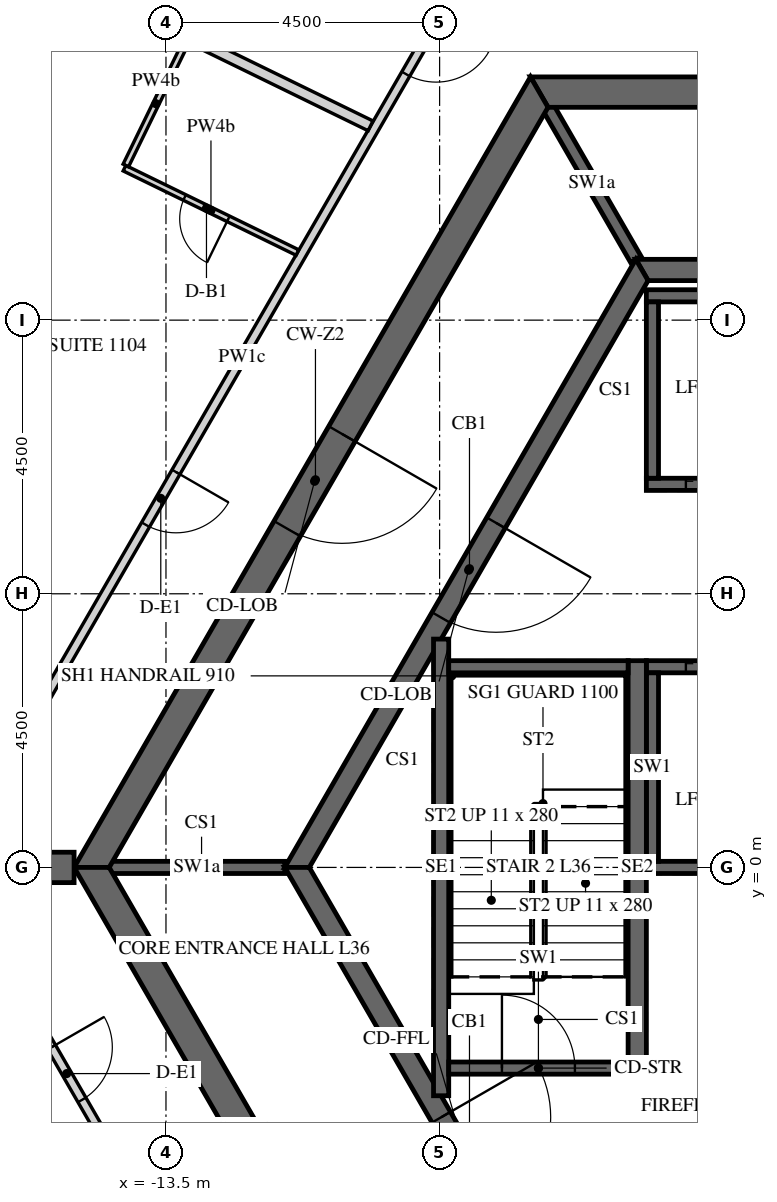
"""IFC4 building model, lengths in metres.
Left out: names, types, materials, properties, quantities, classifications, styles, units other than length and angle.
Written with IfcOpenShell. Run it as: python <this file> out.ifc"""

import sys

from ifc_helpers import new_model, si_unit, direction, frame, frame_2d, origin, place, context, subcontext, project, spatial, polyline, rectangle, outline, extrude, element, fill, save


model = new_model("IFC4")
c1 = context("Model", 3, precision=1e-05, world=origin(), true_north=direction((0.0, 1.0)))
c2 = subcontext(c1, "Body", "Model", "MODEL_VIEW")
j1 = project(units=[si_unit("LENGTHUNIT", "METRE"), si_unit("PLANEANGLEUNIT", "RADIAN")], contexts=[c1])
p1 = place(None, origin())
s1 = spatial("IfcSite", under=j1, at=p1, CompositionType="ELEMENT")
p2 = place(p1, origin())
s2 = spatial("IfcBuilding", under=s1, at=p2, CompositionType="ELEMENT")
p3 = place(p2, frame((0.0, 0.0, 156.6)))
s3 = spatial("IfcBuildingStorey", under=s2, at=p3, CompositionType="ELEMENT", Elevation=156.6)
p4 = place(p3, frame((-7.361, 12.75, -0.15), z_axis=(0.0, 0.0, 1.0), x_axis=(-0.50000571537, -0.866022103989, 0.0)))
e1 = element("IfcWall", 1, at=p4, inside=s3, PredefinedType="SHEAR", context=c2, shape_type="SweptSolid", body=[
    extrude(outline(polyline([(-0.144, -0.25), (14.867, -0.25), (14.578, 0.25), (0.144, 0.25), (-0.144, -0.25)])), origin(), (0.0, 0.0, 1.0), 3.9),
])
p5 = place(p4, frame((6.49, 0.0, 0.15)))
e2 = element("IfcOpeningElement", 2, at=p5, cuts=e1, PredefinedType="OPENING", context=c2, shape_type="SweptSolid", body=[
    extrude(rectangle(XDim=1.8, YDim=2.4, at=frame_2d((0.9, 1.2))), frame((0.0, 0.26, 0.0), z_axis=(0.0, -1.0, 0.0), x_axis=(1.0, 0.0, 0.0)), (0.0, 0.0, 1.0), 0.52),
])
p6 = place(p3, frame((-14.722, 0.0, -0.15), z_axis=(0.0, 0.0, 1.0), x_axis=(0.50000571537, -0.866022103989, 0.0)))
e3 = element("IfcWall", 3, at=p6, inside=s3, PredefinedType="SHEAR", context=c2, shape_type="SweptSolid", body=[
    extrude(outline(polyline([(-0.144, -0.25), (14.867, -0.25), (14.578, 0.25), (0.144, 0.25), (-0.144, -0.25)])), origin(), (0.0, 0.0, 1.0), 3.9),
])
p7 = place(p6, frame((6.432, 0.0, 0.15)))
e4 = element("IfcOpeningElement", 4, at=p7, cuts=e3, PredefinedType="OPENING", context=c2, shape_type="SweptSolid", body=[
    extrude(rectangle(XDim=1.8, YDim=2.4, at=frame_2d((0.9, 1.2))), frame((0.0, 0.26, 0.0), z_axis=(0.0, -1.0, 0.0), x_axis=(1.0, 0.0, 0.0)), (0.0, 0.0, 1.0), 0.52),
])
p8 = place(p3, frame((7.361, 12.75, -0.15), z_axis=(0.0, 0.0, 1.0), x_axis=(-1.0, 0.0, 0.0)))
e5 = element("IfcWall", 5, at=p8, inside=s3, PredefinedType="SHEAR", context=c2, shape_type="SweptSolid", body=[
    extrude(outline(polyline([(-0.144, -0.25), (14.866, -0.25), (14.578, 0.25), (0.144, 0.25), (-0.144, -0.25)])), origin(), (0.0, 0.0, 1.0), 3.9),
])
p9 = place(p8, frame((6.761, 0.0, 0.15)))
e6 = element("IfcOpeningElement", 6, at=p9, cuts=e5, PredefinedType="OPENING", context=c2, shape_type="SweptSolid", body=[
    extrude(rectangle(XDim=1.2, YDim=2.4, at=frame_2d((0.6, 1.2))), frame((0.0, 0.26, 0.0), z_axis=(0.0, -1.0, 0.0), x_axis=(1.0, 0.0, 0.0)), (0.0, 0.0, 1.0), 0.52),
])
p10 = place(p3, frame((-15.011, 0.0, -0.15), z_axis=(0.0, 0.0, 1.0), x_axis=(-1.0, 0.0, 0.0)))
e7 = element("IfcWall", 7, at=p10, inside=s3, PredefinedType="SHEAR", context=c2, shape_type="SweptSolid", body=[
    extrude(rectangle(XDim=15.424, YDim=0.5, at=frame_2d((7.712, 0.0))), origin(), (0.0, 0.0, 1.0), 3.9),
])
p11 = place(p10, frame((6.812, 0.0, 0.15)))
e8 = element("IfcOpeningElement", 8, at=p11, cuts=e7, PredefinedType="OPENING", context=c2, shape_type="SweptSolid", body=[
    extrude(rectangle(XDim=1.8, YDim=2.4, at=frame_2d((0.9, 1.2))), frame((0.0, 0.26, 0.0), z_axis=(0.0, -1.0, 0.0), x_axis=(1.0, 0.0, 0.0)), (0.0, 0.0, 1.0), 0.52),
])
p12 = place(p3, frame((-5.673, 9.825, -0.15), z_axis=(0.0, 0.0, 1.0), x_axis=(-0.499995046907, -0.866028263435, 0.0)))
e9 = element("IfcWall", 9, at=p12, inside=s3, PredefinedType="SHEAR", context=c2, shape_type="SweptSolid", body=[
    extrude(outline(polyline([(-0.101, -0.175), (11.446, -0.175), (11.244, 0.175), (0.101, 0.175), (-0.101, -0.175)])), origin(), (0.0, 0.0, 1.0), 3.9),
])
p13 = place(p12, frame((4.801, 0.0, 0.15)))
e10 = element("IfcOpeningElement", 10, at=p13, cuts=e9, PredefinedType="OPENING", context=c2, shape_type="SweptSolid", body=[
    extrude(rectangle(XDim=1.8, YDim=2.4, at=frame_2d((0.9, 1.2))), frame((0.0, 0.185, 0.0), z_axis=(0.0, -1.0, 0.0), x_axis=(1.0, 0.0, 0.0)), (0.0, 0.0, 1.0), 0.37),
])
p14 = place(p3, frame((-11.345, 0.0, -0.15), z_axis=(0.0, 0.0, 1.0), x_axis=(0.499995046907, -0.866028263435, 0.0)))
e11 = element("IfcWall", 11, at=p14, inside=s3, PredefinedType="SHEAR", context=c2, shape_type="SweptSolid", body=[
    extrude(outline(polyline([(-0.101, -0.175), (11.446, -0.175), (11.244, 0.175), (0.101, 0.175), (-0.101, -0.175)])), origin(), (0.0, 0.0, 1.0), 3.9),
])
p15 = place(p14, frame((4.744, 0.0, 0.15)))
e12 = element("IfcOpeningElement", 12, at=p15, cuts=e11, PredefinedType="OPENING", context=c2, shape_type="SweptSolid", body=[
    extrude(rectangle(XDim=1.8, YDim=2.4, at=frame_2d((0.9, 1.2))), frame((0.0, 0.185, 0.0), z_axis=(0.0, -1.0, 0.0), x_axis=(1.0, 0.0, 0.0)), (0.0, 0.0, 1.0), 0.37),
])
p16 = place(p3, frame((5.673, 9.825, -0.15), z_axis=(0.0, 0.0, 1.0), x_axis=(-1.0, 0.0, 0.0)))
e13 = element("IfcWall", 13, at=p16, inside=s3, PredefinedType="SHEAR", context=c2, shape_type="SweptSolid", body=[
    extrude(outline(polyline([(-0.101, -0.175), (11.446, -0.175), (11.244, 0.175), (0.101, 0.175), (-0.101, -0.175)])), origin(), (0.0, 0.0, 1.0), 3.9),
])
p17 = place(p3, frame((-5.6, 6.3, -0.25), z_axis=(0.0, 0.0, 1.0), x_axis=(1.0, 0.0, 0.0)))
e14 = element("IfcWall", 14, at=p17, inside=s3, PredefinedType="SHEAR", context=c2, shape_type="SweptSolid", body=[
    extrude(rectangle(XDim=11.2, YDim=0.2, at=frame_2d((5.6, 0.0))), origin(), (0.0, 0.0, 1.0), 3.9),
])
p18 = place(p17, frame((8.45, 0.0, 0.25)))
e15 = element("IfcOpeningElement", 15, at=p18, cuts=e14, PredefinedType="OPENING", context=c2, shape_type="SweptSolid", body=[
    extrude(rectangle(XDim=0.9, YDim=2.1, at=frame_2d((0.45, 1.05))), frame((0.0, 0.11, 0.0), z_axis=(0.0, -1.0, 0.0), x_axis=(1.0, 0.0, 0.0)), (0.0, 0.0, 1.0), 0.22),
])
p19 = place(p17, frame((0.65, 0.0, 0.25)))
e16 = element("IfcOpeningElement", 16, at=p19, cuts=e14, PredefinedType="OPENING", context=c2, shape_type="SweptSolid", body=[
    extrude(rectangle(XDim=1.1, YDim=2.1, at=frame_2d((0.55, 1.05))), frame((0.0, 0.11, 0.0), z_axis=(0.0, -1.0, 0.0), x_axis=(1.0, 0.0, 0.0)), (0.0, 0.0, 1.0), 0.22),
])
p20 = place(p17, frame((2.85, 0.0, 0.25)))
e17 = element("IfcOpeningElement", 17, at=p20, cuts=e14, PredefinedType="OPENING", context=c2, shape_type="SweptSolid", body=[
    extrude(rectangle(XDim=1.1, YDim=2.1, at=frame_2d((0.55, 1.05))), frame((0.0, 0.11, 0.0), z_axis=(0.0, -1.0, 0.0), x_axis=(1.0, 0.0, 0.0)), (0.0, 0.0, 1.0), 0.22),
])
p21 = place(p17, frame((5.05, 0.0, 0.25)))
e18 = element("IfcOpeningElement", 18, at=p21, cuts=e14, PredefinedType="OPENING", context=c2, shape_type="SweptSolid", body=[
    extrude(rectangle(XDim=1.1, YDim=2.1, at=frame_2d((0.55, 1.05))), frame((0.0, 0.11, 0.0), z_axis=(0.0, -1.0, 0.0), x_axis=(1.0, 0.0, 0.0)), (0.0, 0.0, 1.0), 0.22),
])
p22 = place(p3, frame((-5.6, 9.4, -0.25), z_axis=(0.0, 0.0, 1.0), x_axis=(1.0, 0.0, 0.0)))
e19 = element("IfcWall", 19, at=p22, inside=s3, PredefinedType="SHEAR", context=c2, shape_type="SweptSolid", body=[
    extrude(rectangle(XDim=11.2, YDim=0.2, at=frame_2d((5.6, 0.0))), origin(), (0.0, 0.0, 1.0), 3.9),
])
p23 = place(p3, frame((-5.5, 6.4, -0.25), z_axis=(0.0, 0.0, 1.0), x_axis=(0.0, 1.0, 0.0)))
e20 = element("IfcWall", 20, at=p23, inside=s3, PredefinedType="SHEAR", context=c2, shape_type="SweptSolid", body=[
    extrude(rectangle(XDim=2.9, YDim=0.2, at=frame_2d((1.45, 0.0))), origin(), (0.0, 0.0, 1.0), 3.9),
])
p24 = place(p3, frame((-5.6, 3.3, -0.25), z_axis=(0.0, 0.0, 1.0), x_axis=(1.0, 0.0, 0.0)))
e21 = element("IfcWall", 21, at=p24, inside=s3, PredefinedType="SHEAR", context=c2, shape_type="SweptSolid", body=[
    extrude(rectangle(XDim=11.2, YDim=0.2, at=frame_2d((5.6, 0.0))), origin(), (0.0, 0.0, 1.0), 3.9),
])
p25 = place(p24, frame((0.65, 0.0, 0.25)))
e22 = element("IfcOpeningElement", 22, at=p25, cuts=e21, PredefinedType="OPENING", context=c2, shape_type="SweptSolid", body=[
    extrude(rectangle(XDim=1.1, YDim=2.1, at=frame_2d((0.55, 1.05))), frame((0.0, 0.11, 0.0), z_axis=(0.0, -1.0, 0.0), x_axis=(1.0, 0.0, 0.0)), (0.0, 0.0, 1.0), 0.22),
])
p26 = place(p24, frame((2.85, 0.0, 0.25)))
e23 = element("IfcOpeningElement", 23, at=p26, cuts=e21, PredefinedType="OPENING", context=c2, shape_type="SweptSolid", body=[
    extrude(rectangle(XDim=1.1, YDim=2.1, at=frame_2d((0.55, 1.05))), frame((0.0, 0.11, 0.0), z_axis=(0.0, -1.0, 0.0), x_axis=(1.0, 0.0, 0.0)), (0.0, 0.0, 1.0), 0.22),
])
p27 = place(p24, frame((5.05, 0.0, 0.25)))
e24 = element("IfcOpeningElement", 24, at=p27, cuts=e21, PredefinedType="OPENING", context=c2, shape_type="SweptSolid", body=[
    extrude(rectangle(XDim=1.1, YDim=2.1, at=frame_2d((0.55, 1.05))), frame((0.0, 0.11, 0.0), z_axis=(0.0, -1.0, 0.0), x_axis=(1.0, 0.0, 0.0)), (0.0, 0.0, 1.0), 0.22),
])
p28 = place(p24, frame((7.25, 0.0, 0.25)))
e25 = element("IfcOpeningElement", 25, at=p28, cuts=e21, PredefinedType="OPENING", context=c2, shape_type="SweptSolid", body=[
    extrude(rectangle(XDim=1.1, YDim=2.1, at=frame_2d((0.55, 1.05))), frame((0.0, 0.11, 0.0), z_axis=(0.0, -1.0, 0.0), x_axis=(1.0, 0.0, 0.0)), (0.0, 0.0, 1.0), 0.22),
])
p29 = place(p24, frame((9.45, 0.0, 0.25)))
e26 = element("IfcOpeningElement", 26, at=p29, cuts=e21, PredefinedType="OPENING", context=c2, shape_type="SweptSolid", body=[
    extrude(rectangle(XDim=1.1, YDim=2.1, at=frame_2d((0.55, 1.05))), frame((0.0, 0.11, 0.0), z_axis=(0.0, -1.0, 0.0), x_axis=(1.0, 0.0, 0.0)), (0.0, 0.0, 1.0), 0.22),
])
p30 = place(p3, frame((-5.6, 0.0, -0.25), z_axis=(0.0, 0.0, 1.0), x_axis=(1.0, 0.0, 0.0)))
e27 = element("IfcWall", 27, at=p30, inside=s3, PredefinedType="SHEAR", context=c2, shape_type="SweptSolid", body=[
    extrude(rectangle(XDim=11.2, YDim=0.2, at=frame_2d((5.6, 0.0))), origin(), (0.0, 0.0, 1.0), 3.9),
])
p31 = place(p3, frame((-5.5, 0.1, -0.25), z_axis=(0.0, 0.0, 1.0), x_axis=(0.0, 1.0, 0.0)))
e28 = element("IfcWall", 28, at=p31, inside=s3, PredefinedType="SHEAR", context=c2, shape_type="SweptSolid", body=[
    extrude(rectangle(XDim=3.1, YDim=0.2, at=frame_2d((1.55, 0.0))), origin(), (0.0, 0.0, 1.0), 3.9),
])
for number, where, z_axis, x_axis in (
    (29, (-5.773, 10.0, -0.15), (0.0, 0.0, 1.0), (-0.5, 0.866, 0.0)),
    (30, (-11.547, 0.0, -0.15), (0.0, 0.0, 1.0), (-1.0, 0.0, 0.0)),
):
    element("IfcWall", number, at=place(p3, frame(where, z_axis=z_axis, x_axis=x_axis)), inside=s3, PredefinedType="SHEAR", context=c2, shape_type="SweptSolid", body=[
        extrude(rectangle(XDim=2.887, YDim=0.2, at=frame_2d((1.443, 0.0))), origin(), (0.0, 0.0, 1.0), 3.9),
    ])
p32 = place(p3, frame((-5.75, -3.4, -0.25), z_axis=(0.0, 0.0, 1.0), x_axis=(0.0, 1.0, 0.0)))
e31 = element("IfcWall", 31, at=p32, inside=s3, PredefinedType="SHEAR", context=c2, shape_type="SweptSolid", body=[
    extrude(rectangle(XDim=6.8, YDim=0.3, at=frame_2d((3.4, 0.0))), origin(), (0.0, 0.0, 1.0), 3.9),
])
p33 = place(p3, frame((-8.975, -3.755, -0.25), z_axis=(0.0, 0.0, 1.0), x_axis=(0.0, 1.0, 0.0)))
e32 = element("IfcWall", 32, at=p33, inside=s3, PredefinedType="SHEAR", context=c2, shape_type="SweptSolid", body=[
    extrude(rectangle(XDim=7.51, YDim=0.25, at=frame_2d((3.755, 0.0))), origin(), (0.0, 0.0, 1.0), 3.9),
])
p34 = place(p3, frame((-8.85, 3.3, -0.25), z_axis=(0.0, 0.0, 1.0), x_axis=(1.0, 0.0, 0.0)))
e33 = element("IfcWall", 33, at=p34, inside=s3, PredefinedType="SHEAR", context=c2, shape_type="SweptSolid", body=[
    extrude(rectangle(XDim=2.95, YDim=0.2, at=frame_2d((1.475, 0.0))), origin(), (0.0, 0.0, 1.0), 3.9),
])
p35 = place(p3, frame((-8.85, -3.3, -0.25), z_axis=(0.0, 0.0, 1.0), x_axis=(1.0, 0.0, 0.0)))
e34 = element("IfcWall", 34, at=p35, inside=s3, PredefinedType="SHEAR", context=c2, shape_type="SweptSolid", body=[
    extrude(rectangle(XDim=2.95, YDim=0.2, at=frame_2d((1.475, 0.0))), origin(), (0.0, 0.0, 1.0), 3.9),
])
p36 = place(p35, frame((0.875, 0.0, 0.25)))
e35 = element("IfcOpeningElement", 35, at=p36, cuts=e34, PredefinedType="OPENING", context=c2, shape_type="SweptSolid", body=[
    extrude(rectangle(XDim=1.2, YDim=2.4, at=frame_2d((0.6, 1.2))), frame((0.0, 0.11, 0.0), z_axis=(0.0, -1.0, 0.0), x_axis=(1.0, 0.0, 0.0)), (0.0, 0.0, 1.0), 0.22),
])
p37 = place(p3, frame((-8.588, 14.725, 0.0), z_axis=(0.0, 0.0, 1.0), x_axis=(-0.499996322767, -0.866027526826, 0.0)))
e36 = element("IfcWall", 36, at=p37, inside=s3, PredefinedType="PARTITIONING", context=c2, shape_type="SweptSolid", body=[
    extrude(rectangle(XDim=14.636, YDim=0.15, at=frame_2d((7.318, 0.0))), origin(), (0.0, 0.0, 1.0), 2.823),
])
p38 = place(p37, frame((0.936, 0.0, 0.0)))
e37 = element("IfcOpeningElement", 37, at=p38, cuts=e36, PredefinedType="OPENING", context=c2, shape_type="SweptSolid", body=[
    extrude(rectangle(XDim=1.0, YDim=2.1, at=frame_2d((0.5, 1.05))), frame((0.0, 0.085, 0.0), z_axis=(0.0, -1.0, 0.0), x_axis=(1.0, 0.0, 0.0)), (0.0, 0.0, 1.0), 0.17),
])
p39 = place(p37, frame((9.495, 0.0, 0.0)))
e38 = element("IfcOpeningElement", 38, at=p39, cuts=e36, PredefinedType="OPENING", context=c2, shape_type="SweptSolid", body=[
    extrude(rectangle(XDim=1.0, YDim=2.1, at=frame_2d((0.5, 1.05))), frame((0.0, 0.085, 0.0), z_axis=(0.0, -1.0, 0.0), x_axis=(1.0, 0.0, 0.0)), (0.0, 0.0, 1.0), 0.17),
])
p40 = place(p3, frame((-15.863, -2.125, 0.0), z_axis=(0.0, 0.0, 1.0), x_axis=(0.500008833422, -0.866020303746, 0.0)))
e39 = element("IfcWall", 39, at=p40, inside=s3, PredefinedType="PARTITIONING", context=c2, shape_type="SweptSolid", body=[
    extrude(rectangle(XDim=14.636, YDim=0.15, at=frame_2d((7.318, 0.0))), origin(), (0.0, 0.0, 1.0), 2.823),
])
p41 = place(p40, frame((0.961, 0.0, 0.0)))
e40 = element("IfcOpeningElement", 40, at=p41, cuts=e39, PredefinedType="OPENING", context=c2, shape_type="SweptSolid", body=[
    extrude(rectangle(XDim=1.0, YDim=2.1, at=frame_2d((0.5, 1.05))), frame((0.0, 0.085, 0.0), z_axis=(0.0, -1.0, 0.0), x_axis=(1.0, 0.0, 0.0)), (0.0, 0.0, 1.0), 0.17),
])
p42 = place(p40, frame((7.309, 0.0, 0.0)))
e41 = element("IfcOpeningElement", 41, at=p42, cuts=e39, PredefinedType="OPENING", context=c2, shape_type="SweptSolid", body=[
    extrude(rectangle(XDim=1.0, YDim=2.1, at=frame_2d((0.5, 1.05))), frame((0.0, 0.085, 0.0), z_axis=(0.0, -1.0, 0.0), x_axis=(1.0, 0.0, 0.0)), (0.0, 0.0, 1.0), 0.17),
])
p43 = place(p40, frame((13.486, 0.0, 0.0)))
e42 = element("IfcOpeningElement", 42, at=p43, cuts=e39, PredefinedType="OPENING", context=c2, shape_type="SweptSolid", body=[
    extrude(rectangle(XDim=1.0, YDim=2.1, at=frame_2d((0.5, 1.05))), frame((0.0, 0.085, 0.0), z_axis=(0.0, -1.0, 0.0), x_axis=(1.0, 0.0, 0.0)), (0.0, 0.0, 1.0), 0.17),
])
p44 = place(p3, frame((-21.815, 17.892, 0.0), z_axis=(0.0, 0.0, 1.0), x_axis=(0.898798778742, -0.43836144371, 0.0)))
e43 = element("IfcWall", 43, at=p44, inside=s3, PredefinedType="PARTITIONING", context=c2, shape_type="SweptSolid", body=[
    extrude(rectangle(XDim=12.994, YDim=0.18, at=frame_2d((6.497, 0.0))), origin(), (0.0, 0.0, 1.0), 2.823),
])
p45 = place(p3, frame((-11.338, 10.112, 0.0), z_axis=(0.0, 0.0, 1.0), x_axis=(-0.898781792608, 0.438396269688, 0.0)))
e44 = element("IfcWall", 44, at=p45, inside=s3, PredefinedType="PARTITIONING", context=c2, shape_type="SweptSolid", body=[
    extrude(rectangle(XDim=3.164, YDim=0.1, at=frame_2d((1.582, 0.0))), origin(), (0.0, 0.0, 1.0), 2.823),
])
p46 = place(p45, frame((1.264, 0.0, 0.0)))
e45 = element("IfcOpeningElement", 45, at=p46, cuts=e44, PredefinedType="OPENING", context=c2, shape_type="SweptSolid", body=[
    extrude(rectangle(XDim=0.8, YDim=2.1, at=frame_2d((0.4, 1.05))), frame((0.0, 0.06, 0.0), z_axis=(0.0, -1.0, 0.0), x_axis=(1.0, 0.0, 0.0)), (0.0, 0.0, 1.0), 0.12),
])
p47 = place(p3, frame((-14.16, 11.544, 0.0), z_axis=(0.0, 0.0, 1.0), x_axis=(0.438376807268, 0.898791285477, 0.0)))
e46 = element("IfcWall", 46, at=p47, inside=s3, PredefinedType="PARTITIONING", context=c2, shape_type="SweptSolid", body=[
    extrude(rectangle(XDim=2.26, YDim=0.1, at=frame_2d((1.13, 0.0))), origin(), (0.0, 0.0, 1.0), 2.823),
])
p48 = place(p5, origin())
e47 = element("IfcDoor", 47, at=p48, inside=s3, OperationType="DOUBLE_DOOR_SINGLE_SWING", PredefinedType="DOOR", context=c2, shape_type="SweptSolid", body=[
    extrude(rectangle(XDim=1.8, YDim=2.4, at=frame_2d((0.9, 1.2))), frame((0.0, 0.025, 0.0), z_axis=(0.0, -1.0, 0.0), x_axis=(1.0, 0.0, 0.0)), (0.0, 0.0, 1.0), 0.05),
])
fill(e2, e47)
p49 = place(p13, origin())
e48 = element("IfcDoor", 48, at=p49, inside=s3, OperationType="DOUBLE_DOOR_SINGLE_SWING", PredefinedType="DOOR", context=c2, shape_type="SweptSolid", body=[
    extrude(rectangle(XDim=1.8, YDim=2.4, at=frame_2d((0.9, 1.2))), frame((0.0, 0.025, 0.0), z_axis=(0.0, -1.0, 0.0), x_axis=(1.0, 0.0, 0.0)), (0.0, 0.0, 1.0), 0.05),
])
fill(e10, e48)
p50 = place(p15, origin())
e49 = element("IfcDoor", 49, at=p50, inside=s3, OperationType="DOUBLE_DOOR_SINGLE_SWING", PredefinedType="DOOR", context=c2, shape_type="SweptSolid", body=[
    extrude(rectangle(XDim=1.8, YDim=2.4, at=frame_2d((0.9, 1.2))), frame((0.0, 0.025, 0.0), z_axis=(0.0, -1.0, 0.0), x_axis=(1.0, 0.0, 0.0)), (0.0, 0.0, 1.0), 0.05),
])
fill(e12, e49)
p51 = place(p36, origin())
e50 = element("IfcDoor", 50, at=p51, inside=s3, OperationType="SINGLE_SWING_LEFT", PredefinedType="DOOR", context=c2, shape_type="SweptSolid", body=[
    extrude(rectangle(XDim=1.2, YDim=2.4, at=frame_2d((0.6, 1.2))), frame((0.0, 0.025, 0.0), z_axis=(0.0, -1.0, 0.0), x_axis=(1.0, 0.0, 0.0)), (0.0, 0.0, 1.0), 0.05),
])
fill(e35, e50)
p52 = place(p19, origin())
e51 = element("IfcDoor", 51, at=p52, inside=s3, OperationType="SLIDING_TO_LEFT", PredefinedType="DOOR", context=c2, shape_type="SweptSolid", body=[
    extrude(rectangle(XDim=1.1, YDim=2.1, at=frame_2d((0.55, 1.05))), frame((0.0, 0.025, 0.0), z_axis=(0.0, -1.0, 0.0), x_axis=(1.0, 0.0, 0.0)), (0.0, 0.0, 1.0), 0.05),
])
fill(e16, e51)
p53 = place(p25, origin())
e52 = element("IfcDoor", 52, at=p53, inside=s3, OperationType="SLIDING_TO_LEFT", PredefinedType="DOOR", context=c2, shape_type="SweptSolid", body=[
    extrude(rectangle(XDim=1.1, YDim=2.1, at=frame_2d((0.55, 1.05))), frame((0.0, 0.025, 0.0), z_axis=(0.0, -1.0, 0.0), x_axis=(1.0, 0.0, 0.0)), (0.0, 0.0, 1.0), 0.05),
])
fill(e22, e52)
p54 = place(p38, origin())
e53 = element("IfcDoor", 53, at=p54, inside=s3, OperationType="SINGLE_SWING_RIGHT", PredefinedType="DOOR", context=c2, shape_type="SweptSolid", body=[
    extrude(rectangle(XDim=1.0, YDim=2.1, at=frame_2d((0.5, 1.05))), frame((0.0, 0.025, 0.0), z_axis=(0.0, -1.0, 0.0), x_axis=(1.0, 0.0, 0.0)), (0.0, 0.0, 1.0), 0.05),
])
fill(e37, e53)
p55 = place(p39, origin())
e54 = element("IfcDoor", 54, at=p55, inside=s3, OperationType="SINGLE_SWING_RIGHT", PredefinedType="DOOR", context=c2, shape_type="SweptSolid", body=[
    extrude(rectangle(XDim=1.0, YDim=2.1, at=frame_2d((0.5, 1.05))), frame((0.0, 0.025, 0.0), z_axis=(0.0, -1.0, 0.0), x_axis=(1.0, 0.0, 0.0)), (0.0, 0.0, 1.0), 0.05),
])
fill(e38, e54)
p56 = place(p46, origin())
e55 = element("IfcDoor", 55, at=p56, inside=s3, OperationType="SINGLE_SWING_LEFT", PredefinedType="DOOR", context=c2, shape_type="SweptSolid", body=[
    extrude(rectangle(XDim=0.8, YDim=2.1, at=frame_2d((0.4, 1.05))), frame((0.0, 0.025, 0.0), z_axis=(0.0, -1.0, 0.0), x_axis=(1.0, 0.0, 0.0)), (0.0, 0.0, 1.0), 0.05),
])
fill(e45, e55)
p57 = place(p41, origin())
e56 = element("IfcDoor", 56, at=p57, inside=s3, OperationType="SINGLE_SWING_RIGHT", PredefinedType="DOOR", context=c2, shape_type="SweptSolid", body=[
    extrude(rectangle(XDim=1.0, YDim=2.1, at=frame_2d((0.5, 1.05))), frame((0.0, 0.025, 0.0), z_axis=(0.0, -1.0, 0.0), x_axis=(1.0, 0.0, 0.0)), (0.0, 0.0, 1.0), 0.05),
])
fill(e40, e56)
save(model, sys.argv[1])
